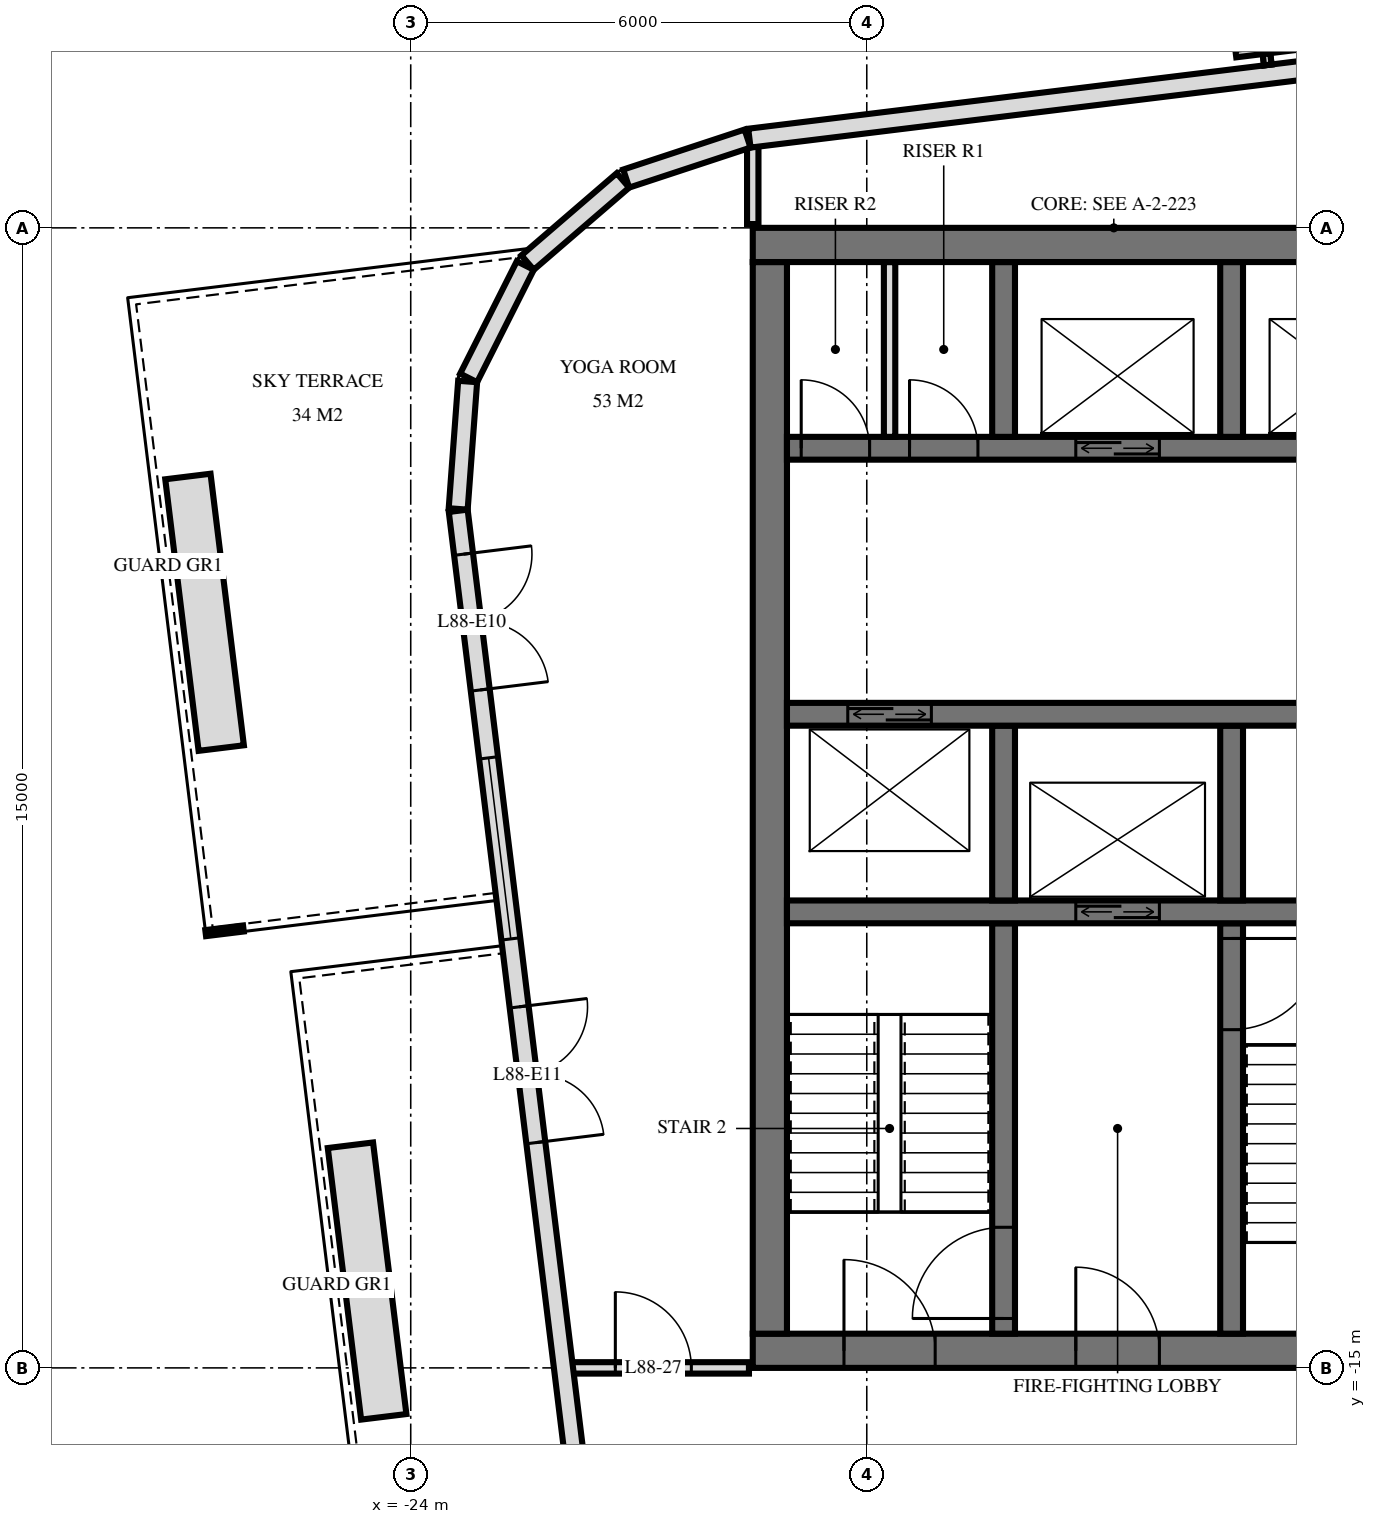
"""IFC4 building model, lengths in metres.
Left out: names, types, materials, properties, quantities, classifications, styles, units other than length and angle.
Written with IfcOpenShell. Run it as: python <this file> out.ifc"""

import sys

from ifc_helpers import new_model, si_unit, direction, frame, frame_2d, origin, place, context, subcontext, project, spatial, rectangle, extrude, element, fill, save


model = new_model("IFC4")
c1 = context("Model", 3, precision=1e-05, world=origin(), true_north=direction((0.0, 1.0)))
c2 = subcontext(c1, "Body", "Model", "MODEL_VIEW")
j1 = project(units=[si_unit("LENGTHUNIT", "METRE"), si_unit("PLANEANGLEUNIT", "RADIAN")], contexts=[c1])
p1 = place(None, origin())
s1 = spatial("IfcSite", under=j1, at=p1, CompositionType="ELEMENT")
p2 = place(p1, origin())
s2 = spatial("IfcBuilding", under=s1, at=p2, CompositionType="ELEMENT")
p3 = place(p2, frame((0.0, 0.0, 334.6)))
s3 = spatial("IfcBuildingStorey", under=s2, at=p3, CompositionType="ELEMENT", Elevation=334.6)
p4 = place(p3, frame((-19.5, -0.225, 0.0), z_axis=(0.0, 0.0, 1.0), x_axis=(1.0, 0.0, 0.0)))
e1 = element("IfcWall", 1, at=p4, inside=s3, PredefinedType="SHEAR", context=c2, shape_type="SweptSolid", body=[
    extrude(rectangle(XDim=9.5, YDim=0.45, at=frame_2d((4.75, 0.0))), origin(), (0.0, 0.0, 1.0), 4.0),
])
p5 = place(p3, frame((-19.5, -14.775, 0.0), z_axis=(0.0, 0.0, 1.0), x_axis=(1.0, 0.0, 0.0)))
e2 = element("IfcWall", 2, at=p5, inside=s3, PredefinedType="SHEAR", context=c2, shape_type="SweptSolid", body=[
    extrude(rectangle(XDim=9.5, YDim=0.45, at=frame_2d((4.75, 0.0))), origin(), (0.0, 0.0, 1.0), 4.0),
])
p6 = place(p5, frame((1.2, 0.0, 0.0)))
e3 = element("IfcOpeningElement", 3, at=p6, cuts=e2, PredefinedType="OPENING", context=c2, shape_type="SweptSolid", body=[
    extrude(rectangle(XDim=1.2, YDim=2.1, at=frame_2d((0.6, 1.05))), frame((0.0, 0.235, 0.0), z_axis=(0.0, -1.0, 0.0), x_axis=(1.0, 0.0, 0.0)), (0.0, 0.0, 1.0), 0.47),
])
p7 = place(p5, frame((4.25, 0.0, 0.0)))
e4 = element("IfcOpeningElement", 4, at=p7, cuts=e2, PredefinedType="OPENING", context=c2, shape_type="SweptSolid", body=[
    extrude(rectangle(XDim=1.1, YDim=2.1, at=frame_2d((0.55, 1.05))), frame((0.0, 0.235, 0.0), z_axis=(0.0, -1.0, 0.0), x_axis=(1.0, 0.0, 0.0)), (0.0, 0.0, 1.0), 0.47),
])
p8 = place(p3, frame((-19.275, -14.55, 0.0), z_axis=(0.0, 0.0, 1.0), x_axis=(0.0, 1.0, 0.0)))
e5 = element("IfcWall", 5, at=p8, inside=s3, PredefinedType="SHEAR", context=c2, shape_type="SweptSolid", body=[
    extrude(rectangle(XDim=14.1, YDim=0.45, at=frame_2d((7.05, 0.0))), origin(), (0.0, 0.0, 1.0), 4.0),
])
p9 = place(p3, frame((-19.05, -2.9, 0.0), z_axis=(0.0, 0.0, 1.0), x_axis=(1.0, 0.0, 0.0)))
e6 = element("IfcWall", 6, at=p9, inside=s3, PredefinedType="SHEAR", context=c2, shape_type="SweptSolid", body=[
    extrude(rectangle(XDim=8.7, YDim=0.3, at=frame_2d((4.35, 0.0))), origin(), (0.0, 0.0, 1.0), 4.0),
])
p10 = place(p9, frame((6.8, 0.0, 0.0)))
e7 = element("IfcOpeningElement", 7, at=p10, cuts=e6, PredefinedType="OPENING", context=c2, shape_type="SweptSolid", body=[
    extrude(rectangle(XDim=1.1, YDim=2.1, at=frame_2d((0.55, 1.05))), frame((0.0, 0.16, 0.0), z_axis=(0.0, -1.0, 0.0), x_axis=(1.0, 0.0, 0.0)), (0.0, 0.0, 1.0), 0.32),
])
p11 = place(p9, frame((3.8, 0.0, 0.0)))
e8 = element("IfcOpeningElement", 8, at=p11, cuts=e6, PredefinedType="OPENING", context=c2, shape_type="SweptSolid", body=[
    extrude(rectangle(XDim=1.1, YDim=2.1, at=frame_2d((0.55, 1.05))), frame((0.0, 0.16, 0.0), z_axis=(0.0, -1.0, 0.0), x_axis=(1.0, 0.0, 0.0)), (0.0, 0.0, 1.0), 0.32),
])
p12 = place(p9, frame((1.613, 0.0, 0.0)))
e9 = element("IfcOpeningElement", 9, at=p12, cuts=e6, PredefinedType="OPENING", context=c2, shape_type="SweptSolid", body=[
    extrude(rectangle(XDim=0.9, YDim=2.1, at=frame_2d((0.45, 1.05))), frame((0.0, 0.16, 0.0), z_axis=(0.0, -1.0, 0.0), x_axis=(1.0, 0.0, 0.0)), (0.0, 0.0, 1.0), 0.32),
])
p13 = place(p9, frame((0.188, 0.0, 0.0)))
e10 = element("IfcOpeningElement", 10, at=p13, cuts=e6, PredefinedType="OPENING", context=c2, shape_type="SweptSolid", body=[
    extrude(rectangle(XDim=0.9, YDim=2.1, at=frame_2d((0.45, 1.05))), frame((0.0, 0.16, 0.0), z_axis=(0.0, -1.0, 0.0), x_axis=(1.0, 0.0, 0.0)), (0.0, 0.0, 1.0), 0.32),
])
p14 = place(p3, frame((-19.05, -6.4, 0.0), z_axis=(0.0, 0.0, 1.0), x_axis=(1.0, 0.0, 0.0)))
e11 = element("IfcWall", 11, at=p14, inside=s3, PredefinedType="SHEAR", context=c2, shape_type="SweptSolid", body=[
    extrude(rectangle(XDim=8.7, YDim=0.3, at=frame_2d((4.35, 0.0))), origin(), (0.0, 0.0, 1.0), 4.0),
])
p15 = place(p14, frame((0.8, 0.0, 0.0)))
e12 = element("IfcOpeningElement", 12, at=p15, cuts=e11, PredefinedType="OPENING", context=c2, shape_type="SweptSolid", body=[
    extrude(rectangle(XDim=1.1, YDim=2.1, at=frame_2d((0.55, 1.05))), frame((0.0, 0.16, 0.0), z_axis=(0.0, -1.0, 0.0), x_axis=(1.0, 0.0, 0.0)), (0.0, 0.0, 1.0), 0.32),
])
p16 = place(p3, frame((-19.05, -9.0, 0.0), z_axis=(0.0, 0.0, 1.0), x_axis=(1.0, 0.0, 0.0)))
e13 = element("IfcWall", 13, at=p16, inside=s3, PredefinedType="SHEAR", context=c2, shape_type="SweptSolid", body=[
    extrude(rectangle(XDim=8.7, YDim=0.3, at=frame_2d((4.35, 0.0))), origin(), (0.0, 0.0, 1.0), 4.0),
])
p17 = place(p16, frame((3.8, 0.0, 0.0)))
e14 = element("IfcOpeningElement", 14, at=p17, cuts=e13, PredefinedType="OPENING", context=c2, shape_type="SweptSolid", body=[
    extrude(rectangle(XDim=1.1, YDim=2.1, at=frame_2d((0.55, 1.05))), frame((0.0, 0.16, 0.0), z_axis=(0.0, -1.0, 0.0), x_axis=(1.0, 0.0, 0.0)), (0.0, 0.0, 1.0), 0.32),
])
for number, where, z_axis, x_axis in (
    (15, (-13.2, -2.75, 0.0), (0.0, 0.0, 1.0), (0.0, 1.0, 0.0)),
    (16, (-13.2, -8.85, 0.0), (0.0, 0.0, 1.0), (0.0, 1.0, 0.0)),
):
    element("IfcWall", number, at=place(p3, frame(where, z_axis=z_axis, x_axis=x_axis)), inside=s3, PredefinedType="SHEAR", context=c2, shape_type="SweptSolid", body=[
        extrude(rectangle(XDim=2.3, YDim=0.3, at=frame_2d((1.15, 0.0))), origin(), (0.0, 0.0, 1.0), 4.0),
    ])
p18 = place(p3, frame((-13.2, -14.55, 0.0), z_axis=(0.0, 0.0, 1.0), x_axis=(0.0, 1.0, 0.0)))
e17 = element("IfcWall", 17, at=p18, inside=s3, PredefinedType="SHEAR", context=c2, shape_type="SweptSolid", body=[
    extrude(rectangle(XDim=5.4, YDim=0.3, at=frame_2d((2.7, 0.0))), origin(), (0.0, 0.0, 1.0), 4.0),
])
p19 = place(p18, frame((4.0, 0.0, 0.0)))
e18 = element("IfcOpeningElement", 18, at=p19, cuts=e17, PredefinedType="OPENING", context=c2, shape_type="SweptSolid", body=[
    extrude(rectangle(XDim=1.2, YDim=2.1, at=frame_2d((0.6, 1.05))), frame((0.0, 0.16, 0.0), z_axis=(0.0, -1.0, 0.0), x_axis=(1.0, 0.0, 0.0)), (0.0, 0.0, 1.0), 0.32),
])
for number, where, z_axis, x_axis in (
    (19, (-16.2, -2.75, 0.0), (0.0, 0.0, 1.0), (0.0, 1.0, 0.0)),
    (20, (-16.2, -8.85, 0.0), (0.0, 0.0, 1.0), (0.0, 1.0, 0.0)),
):
    element("IfcWall", number, at=place(p3, frame(where, z_axis=z_axis, x_axis=x_axis)), inside=s3, PredefinedType="SHEAR", context=c2, shape_type="SweptSolid", body=[
        extrude(rectangle(XDim=2.3, YDim=0.3, at=frame_2d((1.15, 0.0))), origin(), (0.0, 0.0, 1.0), 4.0),
    ])
p20 = place(p3, frame((-16.2, -14.55, 0.0), z_axis=(0.0, 0.0, 1.0), x_axis=(0.0, 1.0, 0.0)))
e21 = element("IfcWall", 21, at=p20, inside=s3, PredefinedType="SHEAR", context=c2, shape_type="SweptSolid", body=[
    extrude(rectangle(XDim=5.4, YDim=0.3, at=frame_2d((2.7, 0.0))), origin(), (0.0, 0.0, 1.0), 4.0),
])
p21 = place(p20, frame((0.2, 0.0, 0.0)))
e22 = element("IfcOpeningElement", 22, at=p21, cuts=e21, PredefinedType="OPENING", context=c2, shape_type="SweptSolid", body=[
    extrude(rectangle(XDim=1.2, YDim=2.1, at=frame_2d((0.6, 1.05))), frame((0.0, 0.16, 0.0), z_axis=(0.0, -1.0, 0.0), x_axis=(1.0, 0.0, 0.0)), (0.0, 0.0, 1.0), 0.32),
])
p22 = place(p3, frame((16.138, 5.561, 0.0), z_axis=(0.0, 0.0, 1.0), x_axis=(-0.992546726876, -0.121864658405, 0.0)))
e23 = element("IfcWall", 23, at=p22, inside=s3, PredefinedType="SOLIDWALL", context=c2, shape_type="SweptSolid", body=[
    extrude(rectangle(XDim=35.951, YDim=0.25, at=frame_2d((17.975, 0.0))), origin(), (0.0, 0.0, 1.0), 3.72),
])
p23 = place(p22, frame((9.275, 0.0, 0.0)))
e24 = element("IfcOpeningElement", 24, at=p23, cuts=e23, PredefinedType="OPENING", context=c2, shape_type="SweptSolid", body=[
    extrude(rectangle(XDim=2.4, YDim=2.4, at=frame_2d((1.2, 1.2))), frame((0.0, 0.135, 0.0), z_axis=(0.0, -1.0, 0.0), x_axis=(1.0, 0.0, 0.0)), (0.0, 0.0, 1.0), 0.27),
])
p24 = place(p3, frame((-19.568, 1.175, 0.0), z_axis=(0.0, 0.0, 1.0), x_axis=(-0.949694735798, -0.313177120489, 0.0)))
e25 = element("IfcWall", 25, at=p24, inside=s3, PredefinedType="SOLIDWALL", context=c2, shape_type="SweptSolid", body=[
    extrude(rectangle(XDim=1.681, YDim=0.25, at=frame_2d((0.841, 0.0))), origin(), (0.0, 0.0, 1.0), 3.72),
])
p25 = place(p3, frame((-21.208, 0.624, 0.0), z_axis=(0.0, 0.0, 1.0), x_axis=(-0.757568315466, -0.652755886531, 0.0)))
e26 = element("IfcWall", 26, at=p25, inside=s3, PredefinedType="SOLIDWALL", context=c2, shape_type="SweptSolid", body=[
    extrude(rectangle(XDim=1.656, YDim=0.25, at=frame_2d((0.828, 0.0))), origin(), (0.0, 0.0, 1.0), 3.72),
])
p26 = place(p3, frame((-22.493, -0.495, 0.0), z_axis=(0.0, 0.0, 1.0), x_axis=(-0.449982385812, -0.893037430604, 0.0)))
e27 = element("IfcWall", 27, at=p26, inside=s3, PredefinedType="SOLIDWALL", context=c2, shape_type="SweptSolid", body=[
    extrude(rectangle(XDim=1.656, YDim=0.25, at=frame_2d((0.828, 0.0))), origin(), (0.0, 0.0, 1.0), 3.72),
])
p27 = place(p3, frame((-23.251, -2.021, 0.0), z_axis=(0.0, 0.0, 1.0), x_axis=(-0.074053534713, -0.997254267475, 0.0)))
e28 = element("IfcWall", 28, at=p27, inside=s3, PredefinedType="SOLIDWALL", context=c2, shape_type="SweptSolid", body=[
    extrude(rectangle(XDim=1.681, YDim=0.25, at=frame_2d((0.841, 0.0))), origin(), (0.0, 0.0, 1.0), 3.72),
])
p28 = place(p3, frame((-23.375, -3.723, 0.0), z_axis=(0.0, 0.0, 1.0), x_axis=(0.121862878281, -0.992546945437, 0.0)))
e29 = element("IfcWall", 29, at=p28, inside=s3, PredefinedType="SOLIDWALL", context=c2, shape_type="SweptSolid", body=[
    extrude(rectangle(XDim=19.151, YDim=0.25, at=frame_2d((9.575, 0.0))), origin(), (0.0, 0.0, 1.0), 3.72),
])
p29 = place(p28, frame((0.575, 0.0, 0.0)))
e30 = element("IfcOpeningElement", 30, at=p29, cuts=e29, PredefinedType="OPENING", context=c2, shape_type="SweptSolid", body=[
    extrude(rectangle(XDim=1.8, YDim=2.4, at=frame_2d((0.9, 1.2))), frame((0.0, 0.135, 0.0), z_axis=(0.0, -1.0, 0.0), x_axis=(1.0, 0.0, 0.0)), (0.0, 0.0, 1.0), 0.27),
])
p30 = place(p28, frame((3.275, 0.0, 0.0)))
e31 = element("IfcOpeningElement", 31, at=p30, cuts=e29, PredefinedType="OPENING", context=c2, shape_type="SweptSolid", body=[
    extrude(rectangle(XDim=2.4, YDim=2.4, at=frame_2d((1.2, 1.2))), frame((0.0, 0.135, 0.0), z_axis=(0.0, -1.0, 0.0), x_axis=(1.0, 0.0, 0.0)), (0.0, 0.0, 1.0), 0.27),
])
p31 = place(p28, frame((6.576, 0.0, 0.0)))
e32 = element("IfcOpeningElement", 32, at=p31, cuts=e29, PredefinedType="OPENING", context=c2, shape_type="SweptSolid", body=[
    extrude(rectangle(XDim=1.8, YDim=2.4, at=frame_2d((0.9, 1.2))), frame((0.0, 0.135, 0.0), z_axis=(0.0, -1.0, 0.0), x_axis=(1.0, 0.0, 0.0)), (0.0, 0.0, 1.0), 0.27),
])
p32 = place(p28, frame((14.675, 0.0, 0.0)))
e33 = element("IfcOpeningElement", 33, at=p32, cuts=e29, PredefinedType="OPENING", context=c2, shape_type="SweptSolid", body=[
    extrude(rectangle(XDim=1.8, YDim=2.4, at=frame_2d((0.9, 1.2))), frame((0.0, 0.135, 0.0), z_axis=(0.0, -1.0, 0.0), x_axis=(1.0, 0.0, 0.0)), (0.0, 0.0, 1.0), 0.27),
])
for number, where, z_axis, x_axis in (
    (34, (-24.355, -15.644, 0.0), (0.0, 0.0, 1.0), (-0.122, 0.993, 0.0)),
    (35, (-26.493, -6.845, 0.0), (0.0, 0.0, 1.0), (-0.122, 0.993, 0.0)),
):
    element("IfcWall", number, at=place(p3, frame(where, z_axis=z_axis, x_axis=x_axis)), inside=s3, PredefinedType="USERDEFINED", context=c2, shape_type="SweptSolid", body=[
        extrude(rectangle(XDim=3.6, YDim=0.6, at=frame_2d((1.8, 0.0))), origin(), (0.0, 0.0, 1.0), 0.65),
    ])
p33 = place(p3, frame((-17.7, -2.75, 0.0), z_axis=(0.0, 0.0, 1.0), x_axis=(0.0, 1.0, 0.0)))
e36 = element("IfcWall", 36, at=p33, inside=s3, PredefinedType="PARTITIONING", context=c2, shape_type="SweptSolid", body=[
    extrude(rectangle(XDim=2.3, YDim=0.15, at=frame_2d((1.15, 0.0))), origin(), (0.0, 0.0, 1.0), 3.7),
])
p34 = place(p3, frame((-19.5, 0.05, 0.0), z_axis=(0.0, 0.0, 1.0), x_axis=(0.0, 1.0, 0.0)))
e37 = element("IfcWall", 37, at=p34, inside=s3, PredefinedType="PARTITIONING", context=c2, shape_type="SweptSolid", body=[
    extrude(rectangle(XDim=1.08, YDim=0.15, at=frame_2d((0.54, 0.0))), origin(), (0.0, 0.0, 1.0), 3.72),
])
p35 = place(p3, frame((-21.935, -15.0, 0.0), z_axis=(0.0, 0.0, 1.0), x_axis=(1.0, 0.0, 0.0)))
e38 = element("IfcWall", 38, at=p35, inside=s3, PredefinedType="PARTITIONING", context=c2, shape_type="SweptSolid", body=[
    extrude(rectangle(XDim=2.385, YDim=0.15, at=frame_2d((1.192, 0.0))), origin(), (0.0, 0.0, 1.0), 3.72),
])
p36 = place(p35, frame((0.627, 0.0, 0.0)))
e39 = element("IfcOpeningElement", 39, at=p36, cuts=e38, PredefinedType="OPENING", context=c2, shape_type="SweptSolid", body=[
    extrude(rectangle(XDim=1.0, YDim=2.1, at=frame_2d((0.5, 1.05))), frame((0.0, 0.085, 0.0), z_axis=(0.0, -1.0, 0.0), x_axis=(1.0, 0.0, 0.0)), (0.0, 0.0, 1.0), 0.17),
])
p37 = place(p29, origin())
e40 = element("IfcDoor", 40, at=p37, inside=s3, OperationType="DOUBLE_DOOR_SINGLE_SWING", PredefinedType="DOOR", context=c2, shape_type="SweptSolid", body=[
    extrude(rectangle(XDim=1.8, YDim=2.4, at=frame_2d((0.9, 1.2))), frame((0.0, 0.025, 0.0), z_axis=(0.0, -1.0, 0.0), x_axis=(1.0, 0.0, 0.0)), (0.0, 0.0, 1.0), 0.05),
])
fill(e30, e40)
p38 = place(p30, origin())
e41 = element("IfcWindow", 41, at=p38, inside=s3, PartitioningType="SINGLE_PANEL", PredefinedType="WINDOW", context=c2, shape_type="SweptSolid", body=[
    extrude(rectangle(XDim=2.4, YDim=2.4, at=frame_2d((1.2, 1.2))), frame((0.0, 0.03, 0.0), z_axis=(0.0, -1.0, 0.0), x_axis=(1.0, 0.0, 0.0)), (0.0, 0.0, 1.0), 0.06),
])
fill(e31, e41)
p39 = place(p31, origin())
e42 = element("IfcDoor", 42, at=p39, inside=s3, OperationType="DOUBLE_DOOR_SINGLE_SWING", PredefinedType="DOOR", context=c2, shape_type="SweptSolid", body=[
    extrude(rectangle(XDim=1.8, YDim=2.4, at=frame_2d((0.9, 1.2))), frame((0.0, 0.025, 0.0), z_axis=(0.0, -1.0, 0.0), x_axis=(1.0, 0.0, 0.0)), (0.0, 0.0, 1.0), 0.05),
])
fill(e32, e42)
p40 = place(p11, origin())
e43 = element("IfcDoor", 43, at=p40, inside=s3, OperationType="DOUBLE_DOOR_SLIDING", PredefinedType="USERDEFINED", context=c2, shape_type="SweptSolid", body=[
    extrude(rectangle(XDim=1.1, YDim=2.1, at=frame_2d((0.55, 1.05))), frame((0.0, 0.025, 0.0), z_axis=(0.0, -1.0, 0.0), x_axis=(1.0, 0.0, 0.0)), (0.0, 0.0, 1.0), 0.05),
])
fill(e8, e43)
p41 = place(p17, origin())
e44 = element("IfcDoor", 44, at=p41, inside=s3, OperationType="DOUBLE_DOOR_SLIDING", PredefinedType="USERDEFINED", context=c2, shape_type="SweptSolid", body=[
    extrude(rectangle(XDim=1.1, YDim=2.1, at=frame_2d((0.55, 1.05))), frame((0.0, 0.025, 0.0), z_axis=(0.0, -1.0, 0.0), x_axis=(1.0, 0.0, 0.0)), (0.0, 0.0, 1.0), 0.05),
])
fill(e14, e44)
p42 = place(p15, origin())
e45 = element("IfcDoor", 45, at=p42, inside=s3, OperationType="DOUBLE_DOOR_SLIDING", PredefinedType="USERDEFINED", context=c2, shape_type="SweptSolid", body=[
    extrude(rectangle(XDim=1.1, YDim=2.1, at=frame_2d((0.55, 1.05))), frame((0.0, 0.025, 0.0), z_axis=(0.0, -1.0, 0.0), x_axis=(1.0, 0.0, 0.0)), (0.0, 0.0, 1.0), 0.05),
])
fill(e12, e45)
p43 = place(p6, origin())
e46 = element("IfcDoor", 46, at=p43, inside=s3, OperationType="SINGLE_SWING_RIGHT", PredefinedType="DOOR", context=c2, shape_type="SweptSolid", body=[
    extrude(rectangle(XDim=1.2, YDim=2.1, at=frame_2d((0.6, 1.05))), frame((0.0, 0.025, 0.0), z_axis=(0.0, -1.0, 0.0), x_axis=(1.0, 0.0, 0.0)), (0.0, 0.0, 1.0), 0.05),
])
fill(e3, e46)
p44 = place(p7, origin())
e47 = element("IfcDoor", 47, at=p44, inside=s3, OperationType="SINGLE_SWING_RIGHT", PredefinedType="DOOR", context=c2, shape_type="SweptSolid", body=[
    extrude(rectangle(XDim=1.1, YDim=2.1, at=frame_2d((0.55, 1.05))), frame((0.0, 0.025, 0.0), z_axis=(0.0, -1.0, 0.0), x_axis=(1.0, 0.0, 0.0)), (0.0, 0.0, 1.0), 0.05),
])
fill(e4, e47)
p45 = place(p12, origin())
e48 = element("IfcDoor", 48, at=p45, inside=s3, OperationType="SINGLE_SWING_RIGHT", PredefinedType="DOOR", context=c2, shape_type="SweptSolid", body=[
    extrude(rectangle(XDim=0.9, YDim=2.1, at=frame_2d((0.45, 1.05))), frame((0.0, 0.025, 0.0), z_axis=(0.0, -1.0, 0.0), x_axis=(1.0, 0.0, 0.0)), (0.0, 0.0, 1.0), 0.05),
])
fill(e9, e48)
p46 = place(p13, origin())
e49 = element("IfcDoor", 49, at=p46, inside=s3, OperationType="SINGLE_SWING_RIGHT", PredefinedType="DOOR", context=c2, shape_type="SweptSolid", body=[
    extrude(rectangle(XDim=0.9, YDim=2.1, at=frame_2d((0.45, 1.05))), frame((0.0, 0.025, 0.0), z_axis=(0.0, -1.0, 0.0), x_axis=(1.0, 0.0, 0.0)), (0.0, 0.0, 1.0), 0.05),
])
fill(e10, e49)
p47 = place(p19, frame((0.6, 0.0, 0.0), z_axis=(0.0, 0.0, 1.0), x_axis=(-1.0, 0.0, 0.0)))
e50 = element("IfcDoor", 50, at=p47, inside=s3, OperationType="SINGLE_SWING_RIGHT", PredefinedType="DOOR", context=c2, shape_type="SweptSolid", body=[
    extrude(rectangle(XDim=1.2, YDim=2.1, at=frame_2d((0.0, 1.05))), frame((0.0, -0.025, 0.0), z_axis=(0.0, 1.0, 0.0), x_axis=(-1.0, 0.0, 0.0)), (0.0, 0.0, 1.0), 0.05),
])
fill(e18, e50)
p48 = place(p21, origin())
e51 = element("IfcDoor", 51, at=p48, inside=s3, OperationType="SINGLE_SWING_RIGHT", PredefinedType="DOOR", context=c2, shape_type="SweptSolid", body=[
    extrude(rectangle(XDim=1.2, YDim=2.1, at=frame_2d((0.6, 1.05))), frame((0.0, 0.025, 0.0), z_axis=(0.0, -1.0, 0.0), x_axis=(1.0, 0.0, 0.0)), (0.0, 0.0, 1.0), 0.05),
])
fill(e22, e51)
p49 = place(p36, origin())
e52 = element("IfcDoor", 52, at=p49, inside=s3, OperationType="SINGLE_SWING_RIGHT", PredefinedType="DOOR", context=c2, shape_type="SweptSolid", body=[
    extrude(rectangle(XDim=1.0, YDim=2.1, at=frame_2d((0.5, 1.05))), frame((0.0, 0.025, 0.0), z_axis=(0.0, -1.0, 0.0), x_axis=(1.0, 0.0, 0.0)), (0.0, 0.0, 1.0), 0.05),
])
fill(e39, e52)
save(model, sys.argv[1])
